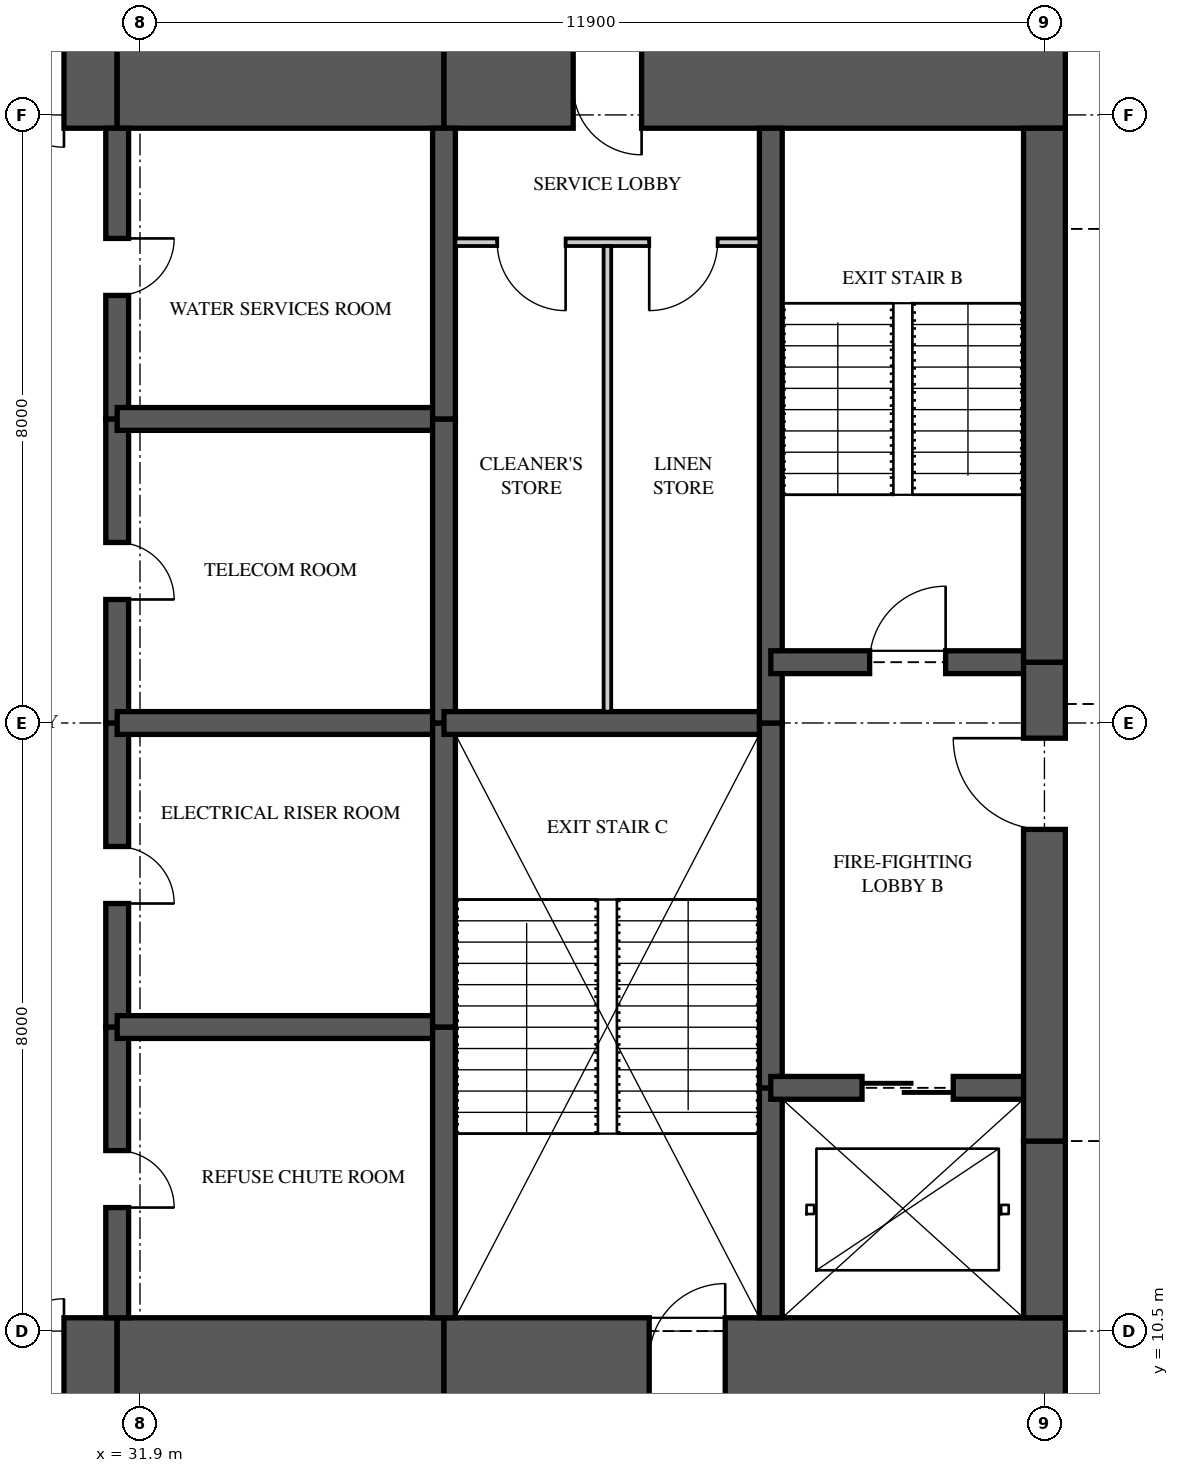
"""IFC4 building model, lengths in metres.
Left out: names, types, materials, properties, quantities, classifications, styles, units other than length and angle.
Written with IfcOpenShell. Run it as: python <this file> out.ifc"""

import sys

from ifc_helpers import new_model, si_unit, direction, frame, frame_2d, origin, place, context, subcontext, project, spatial, rectangle, extrude, element, fill, save


model = new_model("IFC4")
c1 = context("Model", 3, precision=1e-05, world=origin(), true_north=direction((0.0, 1.0)))
c2 = subcontext(c1, "Body", "Model", "MODEL_VIEW")
j1 = project(units=[si_unit("LENGTHUNIT", "METRE"), si_unit("PLANEANGLEUNIT", "RADIAN")], contexts=[c1])
p1 = place(None, origin())
s1 = spatial("IfcSite", under=j1, at=p1, CompositionType="ELEMENT")
p2 = place(p1, origin())
s2 = spatial("IfcBuilding", under=s1, at=p2, CompositionType="ELEMENT")
p3 = place(p2, frame((0.0, 0.0, 221.45)))
s3 = spatial("IfcBuildingStorey", under=s2, at=p3, CompositionType="ELEMENT", Elevation=221.45)
p4 = place(p3, frame((26.0, 10.125, 0.0), z_axis=(0.0, 0.0, 1.0), x_axis=(1.0, 0.0, 0.0)))
e1 = element("IfcWall", 1, at=p4, inside=s3, PredefinedType="SHEAR", context=c2, shape_type="SweptSolid", body=[
    extrude(rectangle(XDim=5.6, YDim=1.1, at=frame_2d((2.8, 0.0))), origin(), (0.0, 0.0, 1.0), 3.5),
])
p5 = place(p4, frame((3.3, 0.0, 0.0)))
e2 = element("IfcOpeningElement", 2, at=p5, cuts=e1, PredefinedType="OPENING", context=c2, shape_type="SweptSolid", body=[
    extrude(rectangle(XDim=1.6, YDim=2.1, at=frame_2d((0.8, 1.05))), frame((0.0, 0.56, 0.0), z_axis=(0.0, -1.0, 0.0), x_axis=(1.0, 0.0, 0.0)), (0.0, 0.0, 1.0), 1.12),
])
p6 = place(p3, frame((31.6, 10.125, 0.0), z_axis=(0.0, 0.0, 1.0), x_axis=(1.0, 0.0, 0.0)))
e3 = element("IfcWall", 3, at=p6, inside=s3, PredefinedType="SHEAR", context=c2, shape_type="SweptSolid", body=[
    extrude(rectangle(XDim=4.3, YDim=1.1, at=frame_2d((2.15, 0.0))), origin(), (0.0, 0.0, 1.0), 3.5),
])
p7 = place(p3, frame((35.9, 10.125, 0.0), z_axis=(0.0, 0.0, 1.0), x_axis=(1.0, 0.0, 0.0)))
e4 = element("IfcWall", 4, at=p7, inside=s3, PredefinedType="SHEAR", context=c2, shape_type="SweptSolid", body=[
    extrude(rectangle(XDim=8.175, YDim=1.1, at=frame_2d((4.087, 0.0))), origin(), (0.0, 0.0, 1.0), 3.5),
])
p8 = place(p7, frame((2.7, 0.0, 0.0)))
e5 = element("IfcOpeningElement", 5, at=p8, cuts=e4, PredefinedType="OPENING", context=c2, shape_type="SweptSolid", body=[
    extrude(rectangle(XDim=1.0, YDim=2.1, at=frame_2d((0.5, 1.05))), frame((0.0, 0.56, 0.0), z_axis=(0.0, -1.0, 0.0), x_axis=(1.0, 0.0, 0.0)), (0.0, 0.0, 1.0), 1.12),
])
p9 = place(p3, frame((44.075, 26.875, 0.0), z_axis=(0.0, 0.0, 1.0), x_axis=(-1.0, 0.0, 0.0)))
e6 = element("IfcWall", 6, at=p9, inside=s3, PredefinedType="SHEAR", context=c2, shape_type="SweptSolid", body=[
    extrude(rectangle(XDim=8.175, YDim=1.1, at=frame_2d((4.087, 0.0))), origin(), (0.0, 0.0, 1.0), 3.5),
])
p10 = place(p9, frame((5.575, 0.0, 0.0)))
e7 = element("IfcOpeningElement", 7, at=p10, cuts=e6, PredefinedType="OPENING", context=c2, shape_type="SweptSolid", body=[
    extrude(rectangle(XDim=0.9, YDim=2.1, at=frame_2d((0.45, 1.05))), frame((0.0, 0.56, 0.0), z_axis=(0.0, -1.0, 0.0), x_axis=(1.0, 0.0, 0.0)), (0.0, 0.0, 1.0), 1.12),
])
p11 = place(p3, frame((35.9, 26.875, 0.0), z_axis=(0.0, 0.0, 1.0), x_axis=(-1.0, 0.0, 0.0)))
e8 = element("IfcWall", 8, at=p11, inside=s3, PredefinedType="SHEAR", context=c2, shape_type="SweptSolid", body=[
    extrude(rectangle(XDim=4.3, YDim=1.1, at=frame_2d((2.15, 0.0))), origin(), (0.0, 0.0, 1.0), 3.5),
])
p12 = place(p3, frame((31.6, 26.875, 0.0), z_axis=(0.0, 0.0, 1.0), x_axis=(-1.0, 0.0, 0.0)))
e9 = element("IfcWall", 9, at=p12, inside=s3, PredefinedType="SHEAR", context=c2, shape_type="SweptSolid", body=[
    extrude(rectangle(XDim=5.6, YDim=1.1, at=frame_2d((2.8, 0.0))), origin(), (0.0, 0.0, 1.0), 3.5),
])
p13 = place(p12, frame((0.7, 0.0, 0.0)))
e10 = element("IfcOpeningElement", 10, at=p13, cuts=e9, PredefinedType="OPENING", context=c2, shape_type="SweptSolid", body=[
    extrude(rectangle(XDim=1.6, YDim=2.1, at=frame_2d((0.8, 1.05))), frame((0.0, 0.56, 0.0), z_axis=(0.0, -1.0, 0.0), x_axis=(1.0, 0.0, 0.0)), (0.0, 0.0, 1.0), 1.12),
])
p14 = place(p3, frame((43.8, 10.675, 0.0), z_axis=(0.0, 0.0, 1.0), x_axis=(0.0, 1.0, 0.0)))
e11 = element("IfcWall", 11, at=p14, inside=s3, PredefinedType="SHEAR", context=c2, shape_type="SweptSolid", body=[
    extrude(rectangle(XDim=2.325, YDim=0.55, at=frame_2d((1.163, 0.0))), origin(), (0.0, 0.0, 1.0), 3.5),
])
p15 = place(p3, frame((43.8, 13.0, 0.0), z_axis=(0.0, 0.0, 1.0), x_axis=(0.0, 1.0, 0.0)))
e12 = element("IfcWall", 12, at=p15, inside=s3, PredefinedType="SHEAR", context=c2, shape_type="SweptSolid", body=[
    extrude(rectangle(XDim=6.3, YDim=0.55, at=frame_2d((3.15, 0.0))), origin(), (0.0, 0.0, 1.0), 3.5),
])
p16 = place(p15, frame((4.1, 0.0, 0.0)))
e13 = element("IfcOpeningElement", 13, at=p16, cuts=e12, PredefinedType="OPENING", context=c2, shape_type="SweptSolid", body=[
    extrude(rectangle(XDim=1.2, YDim=2.2, at=frame_2d((0.6, 1.1))), frame((0.0, 0.285, 0.0), z_axis=(0.0, -1.0, 0.0), x_axis=(1.0, 0.0, 0.0)), (0.0, 0.0, 1.0), 0.57),
])
p17 = place(p3, frame((43.8, 19.3, 0.0), z_axis=(0.0, 0.0, 1.0), x_axis=(0.0, 1.0, 0.0)))
e14 = element("IfcWall", 14, at=p17, inside=s3, PredefinedType="SHEAR", context=c2, shape_type="SweptSolid", body=[
    extrude(rectangle(XDim=7.025, YDim=0.55, at=frame_2d((3.512, 0.0))), origin(), (0.0, 0.0, 1.0), 3.5),
])
p18 = place(p3, frame((31.6, 10.675, 0.0), z_axis=(0.0, 0.0, 1.0), x_axis=(0.0, 1.0, 0.0)))
e15 = element("IfcWall", 15, at=p18, inside=s3, PredefinedType="SHEAR", context=c2, shape_type="SweptSolid", body=[
    extrude(rectangle(XDim=3.825, YDim=0.3, at=frame_2d((1.913, 0.0))), origin(), (0.0, 0.0, 1.0), 3.5),
])
p19 = place(p18, frame((1.45, 0.0, 0.0)))
e16 = element("IfcOpeningElement", 16, at=p19, cuts=e15, PredefinedType="OPENING", context=c2, shape_type="SweptSolid", body=[
    extrude(rectangle(XDim=0.75, YDim=2.1, at=frame_2d((0.375, 1.05))), frame((0.0, 0.16, 0.0), z_axis=(0.0, -1.0, 0.0), x_axis=(1.0, 0.0, 0.0)), (0.0, 0.0, 1.0), 0.32),
])
p20 = place(p3, frame((31.6, 14.5, 0.0), z_axis=(0.0, 0.0, 1.0), x_axis=(0.0, 1.0, 0.0)))
e17 = element("IfcWall", 17, at=p20, inside=s3, PredefinedType="SHEAR", context=c2, shape_type="SweptSolid", body=[
    extrude(rectangle(XDim=4.0, YDim=0.3, at=frame_2d((2.0, 0.0))), origin(), (0.0, 0.0, 1.0), 3.5),
])
p21 = place(p20, frame((1.625, 0.0, 0.0)))
e18 = element("IfcOpeningElement", 18, at=p21, cuts=e17, PredefinedType="OPENING", context=c2, shape_type="SweptSolid", body=[
    extrude(rectangle(XDim=0.75, YDim=2.1, at=frame_2d((0.375, 1.05))), frame((0.0, 0.16, 0.0), z_axis=(0.0, -1.0, 0.0), x_axis=(1.0, 0.0, 0.0)), (0.0, 0.0, 1.0), 0.32),
])
p22 = place(p3, frame((31.6, 18.5, 0.0), z_axis=(0.0, 0.0, 1.0), x_axis=(0.0, 1.0, 0.0)))
e19 = element("IfcWall", 19, at=p22, inside=s3, PredefinedType="SHEAR", context=c2, shape_type="SweptSolid", body=[
    extrude(rectangle(XDim=4.0, YDim=0.3, at=frame_2d((2.0, 0.0))), origin(), (0.0, 0.0, 1.0), 3.5),
])
p23 = place(p22, frame((1.625, 0.0, 0.0)))
e20 = element("IfcOpeningElement", 20, at=p23, cuts=e19, PredefinedType="OPENING", context=c2, shape_type="SweptSolid", body=[
    extrude(rectangle(XDim=0.75, YDim=2.1, at=frame_2d((0.375, 1.05))), frame((0.0, 0.16, 0.0), z_axis=(0.0, -1.0, 0.0), x_axis=(1.0, 0.0, 0.0)), (0.0, 0.0, 1.0), 0.32),
])
p24 = place(p3, frame((31.6, 22.5, 0.0), z_axis=(0.0, 0.0, 1.0), x_axis=(0.0, 1.0, 0.0)))
e21 = element("IfcWall", 21, at=p24, inside=s3, PredefinedType="SHEAR", context=c2, shape_type="SweptSolid", body=[
    extrude(rectangle(XDim=3.825, YDim=0.3, at=frame_2d((1.913, 0.0))), origin(), (0.0, 0.0, 1.0), 3.5),
])
p25 = place(p24, frame((1.625, 0.0, 0.0)))
e22 = element("IfcOpeningElement", 22, at=p25, cuts=e21, PredefinedType="OPENING", context=c2, shape_type="SweptSolid", body=[
    extrude(rectangle(XDim=0.75, YDim=2.1, at=frame_2d((0.375, 1.05))), frame((0.0, 0.16, 0.0), z_axis=(0.0, -1.0, 0.0), x_axis=(1.0, 0.0, 0.0)), (0.0, 0.0, 1.0), 0.32),
])
p26 = place(p3, frame((35.9, 10.675, 0.0), z_axis=(0.0, 0.0, 1.0), x_axis=(0.0, 1.0, 0.0)))
e23 = element("IfcWall", 23, at=p26, inside=s3, PredefinedType="SHEAR", context=c2, shape_type="SweptSolid", body=[
    extrude(rectangle(XDim=3.825, YDim=0.3, at=frame_2d((1.913, 0.0))), origin(), (0.0, 0.0, 1.0), 3.5),
])
for number, where, z_axis, x_axis in (
    (24, (35.9, 14.5, 0.0), (0.0, 0.0, 1.0), (0.0, 1.0, 0.0)),
    (25, (35.9, 18.5, 0.0), (0.0, 0.0, 1.0), (0.0, 1.0, 0.0)),
):
    element("IfcWall", number, at=place(p3, frame(where, z_axis=z_axis, x_axis=x_axis)), inside=s3, PredefinedType="SHEAR", context=c2, shape_type="SweptSolid", body=[
        extrude(rectangle(XDim=4.0, YDim=0.3, at=frame_2d((2.0, 0.0))), origin(), (0.0, 0.0, 1.0), 3.5),
    ])
p27 = place(p3, frame((35.9, 22.5, 0.0), z_axis=(0.0, 0.0, 1.0), x_axis=(0.0, 1.0, 0.0)))
e26 = element("IfcWall", 26, at=p27, inside=s3, PredefinedType="SHEAR", context=c2, shape_type="SweptSolid", body=[
    extrude(rectangle(XDim=3.825, YDim=0.3, at=frame_2d((1.913, 0.0))), origin(), (0.0, 0.0, 1.0), 3.5),
])
p28 = place(p3, frame((40.2, 10.675, 0.0), z_axis=(0.0, 0.0, 1.0), x_axis=(0.0, 1.0, 0.0)))
e27 = element("IfcWall", 27, at=p28, inside=s3, PredefinedType="SHEAR", context=c2, shape_type="SweptSolid", body=[
    extrude(rectangle(XDim=3.025, YDim=0.3, at=frame_2d((1.512, 0.0))), origin(), (0.0, 0.0, 1.0), 3.5),
])
p29 = place(p3, frame((40.2, 13.7, 0.0), z_axis=(0.0, 0.0, 1.0), x_axis=(0.0, 1.0, 0.0)))
e28 = element("IfcWall", 28, at=p29, inside=s3, PredefinedType="SHEAR", context=c2, shape_type="SweptSolid", body=[
    extrude(rectangle(XDim=4.8, YDim=0.3, at=frame_2d((2.4, 0.0))), origin(), (0.0, 0.0, 1.0), 3.5),
])
p30 = place(p3, frame((40.2, 18.5, 0.0), z_axis=(0.0, 0.0, 1.0), x_axis=(0.0, 1.0, 0.0)))
e29 = element("IfcWall", 29, at=p30, inside=s3, PredefinedType="SHEAR", context=c2, shape_type="SweptSolid", body=[
    extrude(rectangle(XDim=7.825, YDim=0.3, at=frame_2d((3.913, 0.0))), origin(), (0.0, 0.0, 1.0), 3.5),
])
for number, where, z_axis, x_axis in (
    (30, (31.6, 14.5, 0.0), (0.0, 0.0, 1.0), (1.0, 0.0, 0.0)),
    (31, (31.6, 18.5, 0.0), (0.0, 0.0, 1.0), (1.0, 0.0, 0.0)),
    (32, (31.6, 22.5, 0.0), (0.0, 0.0, 1.0), (1.0, 0.0, 0.0)),
):
    element("IfcWall", number, at=place(p3, frame(where, z_axis=z_axis, x_axis=x_axis)), inside=s3, PredefinedType="SHEAR", context=c2, shape_type="SweptSolid", body=[
        extrude(rectangle(XDim=4.3, YDim=0.3, at=frame_2d((2.15, 0.0))), origin(), (0.0, 0.0, 1.0), 3.5),
    ])
p31 = place(p3, frame((35.9, 18.5, 0.0), z_axis=(0.0, 0.0, 1.0), x_axis=(1.0, 0.0, 0.0)))
e33 = element("IfcWall", 33, at=p31, inside=s3, PredefinedType="SHEAR", context=c2, shape_type="SweptSolid", body=[
    extrude(rectangle(XDim=4.3, YDim=0.3, at=frame_2d((2.15, 0.0))), origin(), (0.0, 0.0, 1.0), 3.5),
])
p32 = place(p3, frame((40.2, 13.7, 0.0), z_axis=(0.0, 0.0, 1.0), x_axis=(1.0, 0.0, 0.0)))
e34 = element("IfcWall", 34, at=p32, inside=s3, PredefinedType="SHEAR", context=c2, shape_type="SweptSolid", body=[
    extrude(rectangle(XDim=3.6, YDim=0.3, at=frame_2d((1.8, 0.0))), origin(), (0.0, 0.0, 1.0), 3.5),
])
p33 = place(p32, frame((1.2, 0.0, 0.0)))
e35 = element("IfcOpeningElement", 35, at=p33, cuts=e34, PredefinedType="OPENING", context=c2, shape_type="SweptSolid", body=[
    extrude(rectangle(XDim=1.2, YDim=2.1, at=frame_2d((0.6, 1.05))), frame((0.0, 0.16, 0.0), z_axis=(0.0, -1.0, 0.0), x_axis=(1.0, 0.0, 0.0)), (0.0, 0.0, 1.0), 0.32),
])
p34 = place(p3, frame((40.2, 19.3, 0.0), z_axis=(0.0, 0.0, 1.0), x_axis=(1.0, 0.0, 0.0)))
e36 = element("IfcWall", 36, at=p34, inside=s3, PredefinedType="SHEAR", context=c2, shape_type="SweptSolid", body=[
    extrude(rectangle(XDim=3.6, YDim=0.3, at=frame_2d((1.8, 0.0))), origin(), (0.0, 0.0, 1.0), 3.5),
])
p35 = place(p34, frame((1.3, 0.0, 0.0)))
e37 = element("IfcOpeningElement", 37, at=p35, cuts=e36, PredefinedType="OPENING", context=c2, shape_type="SweptSolid", body=[
    extrude(rectangle(XDim=1.0, YDim=2.1, at=frame_2d((0.5, 1.05))), frame((0.0, 0.16, 0.0), z_axis=(0.0, -1.0, 0.0), x_axis=(1.0, 0.0, 0.0)), (0.0, 0.0, 1.0), 0.32),
])
p36 = place(p3, frame((36.05, 24.825, 0.0), z_axis=(0.0, 0.0, 1.0), x_axis=(1.0, 0.0, 0.0)))
e38 = element("IfcWall", 38, at=p36, inside=s3, PredefinedType="PARTITIONING", context=c2, shape_type="SweptSolid", body=[
    extrude(rectangle(XDim=4.0, YDim=0.1, at=frame_2d((2.0, 0.0))), origin(), (0.0, 0.0, 1.0), 3.26),
])
p37 = place(p36, frame((0.55, 0.0, 0.0)))
e39 = element("IfcOpeningElement", 39, at=p37, cuts=e38, PredefinedType="OPENING", context=c2, shape_type="SweptSolid", body=[
    extrude(rectangle(XDim=0.9, YDim=2.1, at=frame_2d((0.45, 1.05))), frame((0.0, 0.06, 0.0), z_axis=(0.0, -1.0, 0.0), x_axis=(1.0, 0.0, 0.0)), (0.0, 0.0, 1.0), 0.12),
])
p38 = place(p36, frame((2.55, 0.0, 0.0)))
e40 = element("IfcOpeningElement", 40, at=p38, cuts=e38, PredefinedType="OPENING", context=c2, shape_type="SweptSolid", body=[
    extrude(rectangle(XDim=0.9, YDim=2.1, at=frame_2d((0.45, 1.05))), frame((0.0, 0.06, 0.0), z_axis=(0.0, -1.0, 0.0), x_axis=(1.0, 0.0, 0.0)), (0.0, 0.0, 1.0), 0.12),
])
p39 = place(p3, frame((38.05, 18.65, 0.0), z_axis=(0.0, 0.0, 1.0), x_axis=(0.0, 1.0, 0.0)))
e41 = element("IfcWall", 41, at=p39, inside=s3, PredefinedType="PARTITIONING", context=c2, shape_type="SweptSolid", body=[
    extrude(rectangle(XDim=6.125, YDim=0.1, at=frame_2d((3.062, 0.0))), origin(), (0.0, 0.0, 1.0), 3.26),
])
p40 = place(p37, frame((0.9, 0.0, 0.0), z_axis=(0.0, 0.0, 1.0), x_axis=(-1.0, 0.0, 0.0)))
e42 = element("IfcDoor", 42, at=p40, inside=s3, OperationType="SINGLE_SWING_LEFT", PredefinedType="DOOR", context=c2, shape_type="SweptSolid", body=[
    extrude(rectangle(XDim=0.9, YDim=2.1, at=frame_2d((0.45, 1.05))), frame((0.0, 0.025, 0.0), z_axis=(0.0, -1.0, 0.0), x_axis=(1.0, 0.0, 0.0)), (0.0, 0.0, 1.0), 0.05),
])
fill(e39, e42)
p41 = place(p38, frame((0.9, 0.0, 0.0), z_axis=(0.0, 0.0, 1.0), x_axis=(-1.0, 0.0, 0.0)))
e43 = element("IfcDoor", 43, at=p41, inside=s3, OperationType="SINGLE_SWING_RIGHT", PredefinedType="DOOR", context=c2, shape_type="SweptSolid", body=[
    extrude(rectangle(XDim=0.9, YDim=2.1, at=frame_2d((0.45, 1.05))), frame((0.0, 0.025, 0.0), z_axis=(0.0, -1.0, 0.0), x_axis=(1.0, 0.0, 0.0)), (0.0, 0.0, 1.0), 0.05),
])
fill(e40, e43)
p42 = place(p35, origin())
e44 = element("IfcDoor", 44, at=p42, inside=s3, OperationType="SINGLE_SWING_RIGHT", PredefinedType="DOOR", context=c2, shape_type="SweptSolid", body=[
    extrude(rectangle(XDim=1.0, YDim=2.1, at=frame_2d((0.5, 1.05))), frame((0.0, 0.025, 0.0), z_axis=(0.0, -1.0, 0.0), x_axis=(1.0, 0.0, 0.0)), (0.0, 0.0, 1.0), 0.05),
])
fill(e37, e44)
p43 = place(p16, origin())
e45 = element("IfcDoor", 45, at=p43, inside=s3, OperationType="SINGLE_SWING_RIGHT", PredefinedType="DOOR", context=c2, shape_type="SweptSolid", body=[
    extrude(rectangle(XDim=1.2, YDim=2.2, at=frame_2d((0.6, 1.1))), frame((0.0, 0.025, 0.0), z_axis=(0.0, -1.0, 0.0), x_axis=(1.0, 0.0, 0.0)), (0.0, 0.0, 1.0), 0.05),
])
fill(e13, e45)
p44 = place(p33, origin())
e46 = element("IfcDoor", 46, at=p44, inside=s3, OperationType="SLIDING_TO_LEFT", PredefinedType="DOOR", context=c2, shape_type="SweptSolid", body=[
    extrude(rectangle(XDim=1.2, YDim=2.1, at=frame_2d((0.6, 1.05))), frame((0.0, 0.025, 0.0), z_axis=(0.0, -1.0, 0.0), x_axis=(1.0, 0.0, 0.0)), (0.0, 0.0, 1.0), 0.05),
])
fill(e35, e46)
p45 = place(p5, origin())
e47 = element("IfcDoor", 47, at=p45, inside=s3, OperationType="DOUBLE_DOOR_SINGLE_SWING", PredefinedType="DOOR", context=c2, shape_type="SweptSolid", body=[
    extrude(rectangle(XDim=1.6, YDim=2.1, at=frame_2d((0.8, 1.05))), frame((0.0, 0.025, 0.0), z_axis=(0.0, -1.0, 0.0), x_axis=(1.0, 0.0, 0.0)), (0.0, 0.0, 1.0), 0.05),
])
fill(e2, e47)
p46 = place(p13, origin())
e48 = element("IfcDoor", 48, at=p46, inside=s3, OperationType="DOUBLE_DOOR_SINGLE_SWING", PredefinedType="DOOR", context=c2, shape_type="SweptSolid", body=[
    extrude(rectangle(XDim=1.6, YDim=2.1, at=frame_2d((0.8, 1.05))), frame((0.0, 0.025, 0.0), z_axis=(0.0, -1.0, 0.0), x_axis=(1.0, 0.0, 0.0)), (0.0, 0.0, 1.0), 0.05),
])
fill(e10, e48)
p47 = place(p19, frame((0.75, 0.0, 0.0), z_axis=(0.0, 0.0, 1.0), x_axis=(-1.0, 0.0, 0.0)))
e49 = element("IfcDoor", 49, at=p47, inside=s3, OperationType="SINGLE_SWING_RIGHT", PredefinedType="DOOR", context=c2, shape_type="SweptSolid", body=[
    extrude(rectangle(XDim=0.75, YDim=2.1, at=frame_2d((0.375, 1.05))), frame((0.0, 0.025, 0.0), z_axis=(0.0, -1.0, 0.0), x_axis=(1.0, 0.0, 0.0)), (0.0, 0.0, 1.0), 0.05),
])
fill(e16, e49)
p48 = place(p21, frame((0.75, 0.0, 0.0), z_axis=(0.0, 0.0, 1.0), x_axis=(-1.0, 0.0, 0.0)))
e50 = element("IfcDoor", 50, at=p48, inside=s3, OperationType="SINGLE_SWING_RIGHT", PredefinedType="DOOR", context=c2, shape_type="SweptSolid", body=[
    extrude(rectangle(XDim=0.75, YDim=2.1, at=frame_2d((0.375, 1.05))), frame((0.0, 0.025, 0.0), z_axis=(0.0, -1.0, 0.0), x_axis=(1.0, 0.0, 0.0)), (0.0, 0.0, 1.0), 0.05),
])
fill(e18, e50)
p49 = place(p23, frame((0.75, 0.0, 0.0), z_axis=(0.0, 0.0, 1.0), x_axis=(-1.0, 0.0, 0.0)))
e51 = element("IfcDoor", 51, at=p49, inside=s3, OperationType="SINGLE_SWING_RIGHT", PredefinedType="DOOR", context=c2, shape_type="SweptSolid", body=[
    extrude(rectangle(XDim=0.75, YDim=2.1, at=frame_2d((0.375, 1.05))), frame((0.0, 0.025, 0.0), z_axis=(0.0, -1.0, 0.0), x_axis=(1.0, 0.0, 0.0)), (0.0, 0.0, 1.0), 0.05),
])
fill(e20, e51)
p50 = place(p25, frame((0.75, 0.0, 0.0), z_axis=(0.0, 0.0, 1.0), x_axis=(-1.0, 0.0, 0.0)))
e52 = element("IfcDoor", 52, at=p50, inside=s3, OperationType="SINGLE_SWING_LEFT", PredefinedType="DOOR", context=c2, shape_type="SweptSolid", body=[
    extrude(rectangle(XDim=0.75, YDim=2.1, at=frame_2d((0.375, 1.05))), frame((0.0, 0.025, 0.0), z_axis=(0.0, -1.0, 0.0), x_axis=(1.0, 0.0, 0.0)), (0.0, 0.0, 1.0), 0.05),
])
fill(e22, e52)
p51 = place(p8, origin())
e53 = element("IfcDoor", 53, at=p51, inside=s3, OperationType="SINGLE_SWING_RIGHT", PredefinedType="DOOR", context=c2, shape_type="SweptSolid", body=[
    extrude(rectangle(XDim=1.0, YDim=2.1, at=frame_2d((0.5, 1.05))), frame((0.0, 0.025, 0.0), z_axis=(0.0, -1.0, 0.0), x_axis=(1.0, 0.0, 0.0)), (0.0, 0.0, 1.0), 0.05),
])
fill(e5, e53)
p52 = place(p10, origin())
e54 = element("IfcDoor", 54, at=p52, inside=s3, OperationType="SINGLE_SWING_LEFT", PredefinedType="DOOR", context=c2, shape_type="SweptSolid", body=[
    extrude(rectangle(XDim=0.9, YDim=2.1, at=frame_2d((0.45, 1.05))), frame((0.0, 0.47, 0.0), z_axis=(0.0, -1.0, 0.0), x_axis=(1.0, 0.0, 0.0)), (0.0, 0.0, 1.0), 0.8),
])
fill(e7, e54)
save(model, sys.argv[1])
